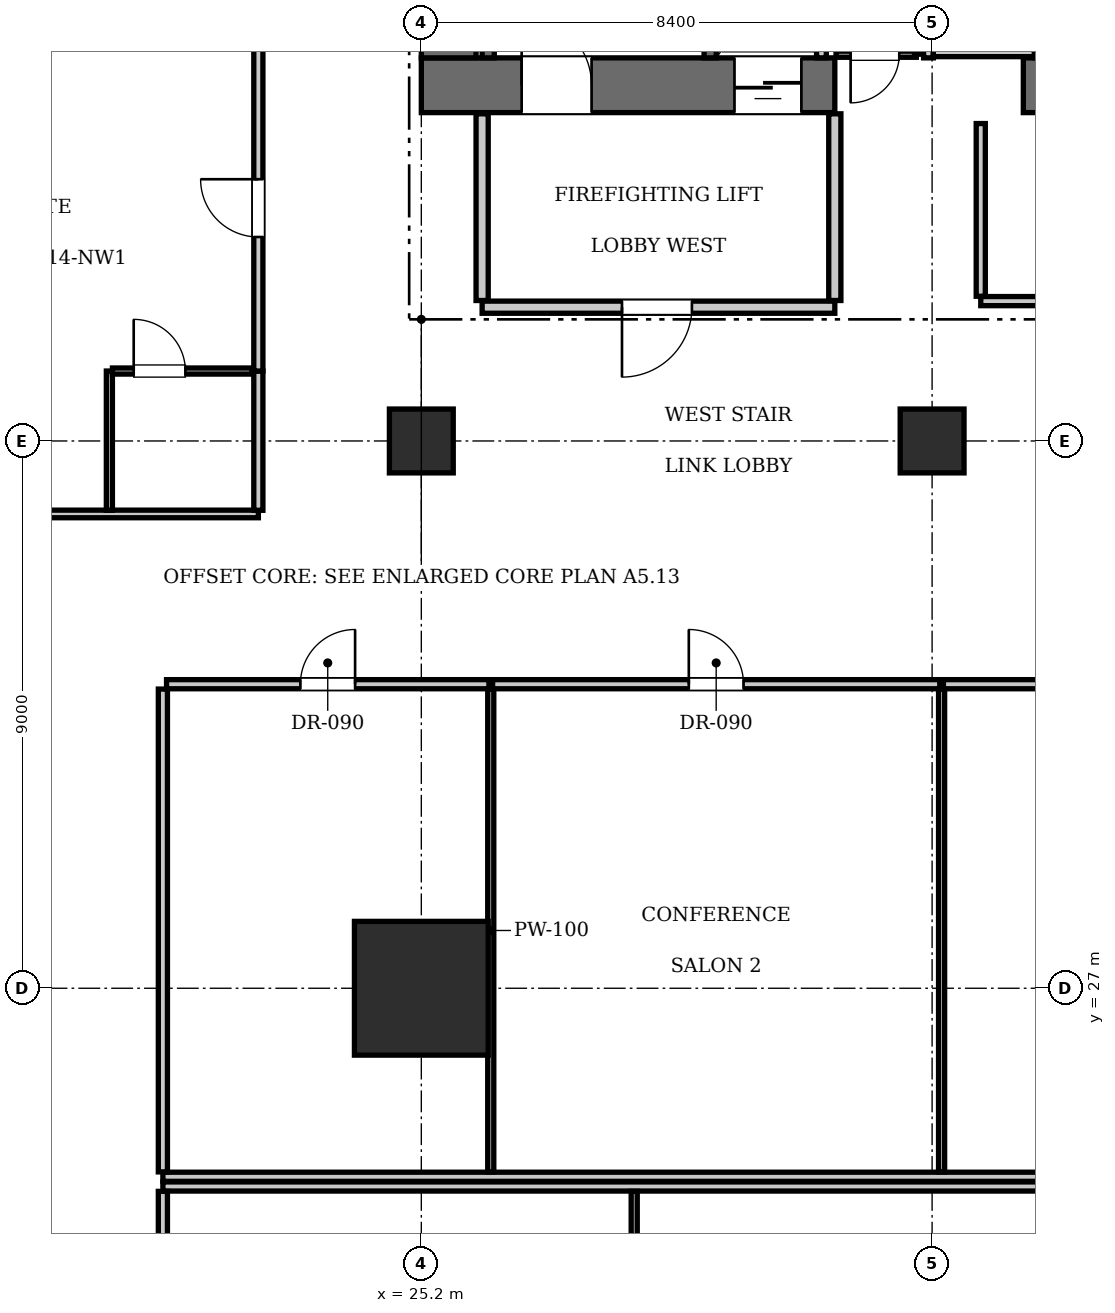
"""IFC4 building model, lengths in metres.
Left out: names, types, materials, properties, quantities, classifications, styles, units other than length and angle.
Written with IfcOpenShell. Run it as: python <this file> out.ifc"""

import sys

from ifc_helpers import new_model, si_unit, direction, frame, frame_2d, origin, origin_2d, place, context, subcontext, project, spatial, rectangle, extrude, element, fill, save


model = new_model("IFC4")
c1 = context("Model", 3, precision=1e-05, world=origin(), true_north=direction((0.0, 1.0)))
c2 = subcontext(c1, "Body", "Model", "MODEL_VIEW")
j1 = project(units=[si_unit("LENGTHUNIT", "METRE"), si_unit("PLANEANGLEUNIT", "RADIAN")], contexts=[c1])
p1 = place(None, origin())
s1 = spatial("IfcSite", under=j1, at=p1, CompositionType="ELEMENT")
p2 = place(p1, origin())
s2 = spatial("IfcBuilding", under=s1, at=p2, CompositionType="ELEMENT")
p3 = place(p2, frame((0.0, 0.0, 61.6)))
s3 = spatial("IfcBuildingStorey", under=s2, at=p3, CompositionType="ELEMENT", Elevation=61.6)
p4 = place(p3, frame((25.2, 27.0, 0.0), z_axis=(0.0, 0.0, 1.0), x_axis=(1.0, 0.0, 0.0)))
e1 = element("IfcColumn", 1, at=p4, inside=s3, PredefinedType="COLUMN", context=c2, shape_type="SweptSolid", body=[
    extrude(rectangle(XDim=2.2, YDim=2.2, at=origin_2d()), origin(), (0.0, 0.0, 1.0), 3.85),
])
p5 = place(p3, frame((25.2, 41.85, 0.0), z_axis=(0.0, 0.0, 1.0), x_axis=(1.0, 0.0, 0.0)))
e2 = element("IfcWall", 2, at=p5, inside=s3, PredefinedType="SHEAR", context=c2, shape_type="SweptSolid", body=[
    extrude(rectangle(XDim=6.8, YDim=0.9, at=frame_2d((3.4, 0.0))), origin(), (0.0, 0.0, 1.0), 3.85),
])
p6 = place(p5, frame((1.65, 0.0, 0.0)))
e3 = element("IfcOpeningElement", 3, at=p6, cuts=e2, PredefinedType="OPENING", context=c2, shape_type="SweptSolid", body=[
    extrude(rectangle(XDim=1.15, YDim=2.15, at=frame_2d((0.575, 1.075))), frame((0.0, 0.46, 0.0), z_axis=(0.0, -1.0, 0.0), x_axis=(1.0, 0.0, 0.0)), (0.0, 0.0, 1.0), 0.92),
])
p7 = place(p5, frame((5.15, 0.0, 0.0)))
e4 = element("IfcOpeningElement", 4, at=p7, cuts=e2, PredefinedType="OPENING", context=c2, shape_type="SweptSolid", body=[
    extrude(rectangle(XDim=1.1, YDim=2.2, at=frame_2d((0.55, 1.1))), frame((0.0, 0.46, 0.0), z_axis=(0.0, -1.0, 0.0), x_axis=(1.0, 0.0, 0.0)), (0.0, 0.0, 1.0), 0.92),
])
p8 = place(p3, frame((35.1, 41.85, 0.0), z_axis=(0.0, 0.0, 1.0), x_axis=(1.0, 0.0, 0.0)))
e5 = element("IfcWall", 5, at=p8, inside=s3, PredefinedType="SHEAR", context=c2, shape_type="SweptSolid", body=[
    extrude(rectangle(XDim=5.4, YDim=0.9, at=frame_2d((2.7, 0.0))), origin(), (0.0, 0.0, 1.0), 3.85),
])
p9 = place(p3, frame((25.65, 42.3, 0.0), z_axis=(0.0, 0.0, 1.0), x_axis=(0.0, 1.0, 0.0)))
e6 = element("IfcWall", 6, at=p9, inside=s3, PredefinedType="SHEAR", context=c2, shape_type="SweptSolid", body=[
    extrude(rectangle(XDim=1.6, YDim=0.9, at=frame_2d((0.8, 0.0))), origin(), (0.0, 0.0, 1.0), 3.85),
])
for number, where, z_axis, x_axis in (
    (7, (25.2, 36.0, 0.0), (0.0, 0.0, 1.0), (1.0, 0.0, 0.0)),
    (8, (33.6, 36.0, 0.0), (0.0, 0.0, 1.0), (1.0, 0.0, 0.0)),
):
    element("IfcColumn", number, at=place(p3, frame(where, z_axis=z_axis, x_axis=x_axis)), inside=s3, PredefinedType="COLUMN", context=c2, shape_type="SweptSolid", body=[
        extrude(rectangle(XDim=1.05, YDim=1.05, at=origin_2d()), origin(), (0.0, 0.0, 1.0), 3.85),
    ])
p10 = place(p3, frame((29.95, 42.3, 0.0), z_axis=(0.0, 0.0, 1.0), x_axis=(0.0, 1.0, 0.0)))
e9 = element("IfcWall", 9, at=p10, inside=s3, PredefinedType="SOLIDWALL", context=c2, shape_type="SweptSolid", body=[
    extrude(rectangle(XDim=8.85, YDim=0.2, at=frame_2d((4.425, 0.0))), origin(), (0.0, 0.0, 1.0), 3.61),
])
p11 = place(p3, frame((26.3, 42.3, 0.0), z_axis=(0.0, 0.0, 1.0), x_axis=(0.0, 1.0, 0.0)))
e10 = element("IfcWall", 10, at=p11, inside=s3, PredefinedType="SOLIDWALL", context=c2, shape_type="SweptSolid", body=[
    extrude(rectangle(XDim=1.58, YDim=0.2, at=frame_2d((0.79, 0.0))), origin(), (0.0, 0.0, 1.0), 3.61),
])
p12 = place(p3, frame((31.78, 42.3, 0.0), z_axis=(0.0, 0.0, 1.0), x_axis=(0.0, 1.0, 0.0)))
e11 = element("IfcWall", 11, at=p12, inside=s3, PredefinedType="SOLIDWALL", context=c2, shape_type="SweptSolid", body=[
    extrude(rectangle(XDim=2.44, YDim=0.16, at=frame_2d((1.22, 0.0))), origin(), (0.0, 0.0, 1.0), 3.61),
])
for number, where, z_axis, x_axis in (
    (12, (33.54, 42.3, 0.0), (0.0, 0.0, 1.0), (0.0, 1.0, 0.0)),
    (13, (35.36, 42.3, 0.0), (0.0, 0.0, 1.0), (0.0, 1.0, 0.0)),
):
    element("IfcWall", number, at=place(p3, frame(where, z_axis=z_axis, x_axis=x_axis)), inside=s3, PredefinedType="SOLIDWALL", context=c2, shape_type="SweptSolid", body=[
        extrude(rectangle(XDim=2.1, YDim=0.16, at=frame_2d((1.05, 0.0))), origin(), (0.0, 0.0, 1.0), 3.61),
    ])
p13 = place(p3, frame((33.62, 42.4, 0.0), z_axis=(0.0, 0.0, 1.0), x_axis=(1.0, 0.0, 0.0)))
e14 = element("IfcWall", 14, at=p13, inside=s3, PredefinedType="SOLIDWALL", context=c2, shape_type="SweptSolid", body=[
    extrude(rectangle(XDim=1.66, YDim=0.16, at=frame_2d((0.83, 0.0))), origin(), (0.0, 0.0, 1.0), 3.61),
])
p14 = place(p3, frame((26.2, 38.2, 0.0), z_axis=(0.0, 0.0, 1.0), x_axis=(1.0, 0.0, 0.0)))
e15 = element("IfcWall", 15, at=p14, inside=s3, PredefinedType="PARTITIONING", context=c2, shape_type="SweptSolid", body=[
    extrude(rectangle(XDim=5.8, YDim=0.2, at=frame_2d((2.9, 0.0))), origin(), (0.0, 0.0, 1.0), 3.61),
])
p15 = place(p14, frame((2.3, 0.0, 0.0)))
e16 = element("IfcOpeningElement", 16, at=p15, cuts=e15, PredefinedType="OPENING", context=c2, shape_type="SweptSolid", body=[
    extrude(rectangle(XDim=1.15, YDim=2.15, at=frame_2d((0.575, 1.075))), frame((0.0, 0.11, 0.0), z_axis=(0.0, -1.0, 0.0), x_axis=(1.0, 0.0, 0.0)), (0.0, 0.0, 1.0), 0.22),
])
for number, where, z_axis, x_axis in (
    (17, (26.2, 38.31, 0.0), (0.0, 0.0, 1.0), (0.0, 1.0, 0.0)),
    (18, (32.0, 38.31, 0.0), (0.0, 0.0, 1.0), (0.0, 1.0, 0.0)),
):
    element("IfcWall", number, at=place(p3, frame(where, z_axis=z_axis, x_axis=x_axis)), inside=s3, PredefinedType="PARTITIONING", context=c2, shape_type="SweptSolid", body=[
        extrude(rectangle(XDim=3.07, YDim=0.2, at=frame_2d((1.535, 0.0))), origin(), (0.0, 0.0, 1.0), 3.61),
    ])
p16 = place(p3, frame((32.02, 42.36, 0.0), z_axis=(0.0, 0.0, 1.0), x_axis=(1.0, 0.0, 0.0)))
e19 = element("IfcWall", 19, at=p16, inside=s3, PredefinedType="PARTITIONING", context=c2, shape_type="SweptSolid", body=[
    extrude(rectangle(XDim=1.32, YDim=0.1, at=frame_2d((0.66, 0.0))), origin(), (0.0, 0.0, 1.0), 3.61),
])
p17 = place(p16, frame((0.24, 0.0, 0.0)))
e20 = element("IfcOpeningElement", 20, at=p17, cuts=e19, PredefinedType="OPENING", context=c2, shape_type="SweptSolid", body=[
    extrude(rectangle(XDim=0.8, YDim=2.05, at=frame_2d((0.4, 1.025))), frame((0.0, 0.06, 0.0), z_axis=(0.0, -1.0, 0.0), x_axis=(1.0, 0.0, 0.0)), (0.0, 0.0, 1.0), 0.12),
])
p18 = place(p3, frame((33.36, 42.36, 0.0), z_axis=(0.0, 0.0, 1.0), x_axis=(0.0, 1.0, 0.0)))
e21 = element("IfcWall", 21, at=p18, inside=s3, PredefinedType="PARTITIONING", context=c2, shape_type="SweptSolid", body=[
    extrude(rectangle(XDim=2.58, YDim=0.1, at=frame_2d((1.29, 0.0))), origin(), (0.0, 0.0, 1.0), 3.61),
])
p19 = place(p3, frame((34.4, 38.3, 0.0), z_axis=(0.0, 0.0, 1.0), x_axis=(1.0, 0.0, 0.0)))
e22 = element("IfcWall", 22, at=p19, inside=s3, PredefinedType="PARTITIONING", context=c2, shape_type="SweptSolid", body=[
    extrude(rectangle(XDim=2.88, YDim=0.15, at=frame_2d((1.44, 0.0))), origin(), (0.0, 0.0, 1.0), 3.61),
])
p20 = place(p19, frame((1.0, 0.0, 0.0)))
e23 = element("IfcOpeningElement", 23, at=p20, cuts=e22, PredefinedType="OPENING", context=c2, shape_type="SweptSolid", body=[
    extrude(rectangle(XDim=0.8, YDim=2.05, at=frame_2d((0.4, 1.025))), frame((0.0, 0.085, 0.0), z_axis=(0.0, -1.0, 0.0), x_axis=(1.0, 0.0, 0.0)), (0.0, 0.0, 1.0), 0.17),
])
p21 = place(p3, frame((34.4, 38.38, 0.0), z_axis=(0.0, 0.0, 1.0), x_axis=(0.0, 1.0, 0.0)))
e24 = element("IfcWall", 24, at=p21, inside=s3, PredefinedType="PARTITIONING", context=c2, shape_type="SweptSolid", body=[
    extrude(rectangle(XDim=2.84, YDim=0.15, at=frame_2d((1.42, 0.0))), origin(), (0.0, 0.0, 1.0), 3.61),
])
p22 = place(p3, frame((20.95, 23.9, 0.0), z_axis=(0.0, 0.0, 1.0), x_axis=(1.0, 0.0, 0.0)))
e25 = element("IfcWall", 25, at=p22, inside=s3, PredefinedType="PARTITIONING", context=c2, shape_type="SweptSolid", body=[
    extrude(rectangle(XDim=33.7, YDim=0.15, at=frame_2d((16.85, 0.0))), origin(), (0.0, 0.0, 1.0), 3.61),
])
p23 = place(p3, frame((20.95, 23.98, 0.0), z_axis=(0.0, 0.0, 1.0), x_axis=(0.0, 1.0, 0.0)))
e26 = element("IfcWall", 26, at=p23, inside=s3, PredefinedType="PARTITIONING", context=c2, shape_type="SweptSolid", body=[
    extrude(rectangle(XDim=7.94, YDim=0.15, at=frame_2d((3.97, 0.0))), origin(), (0.0, 0.0, 1.0), 3.255),
])
p24 = place(p3, frame((21.01, 32.0, 0.0), z_axis=(0.0, 0.0, 1.0), x_axis=(1.0, 0.0, 0.0)))
e27 = element("IfcWall", 27, at=p24, inside=s3, PredefinedType="PARTITIONING", context=c2, shape_type="SweptSolid", body=[
    extrude(rectangle(XDim=5.302, YDim=0.15, at=frame_2d((2.651, 0.0))), origin(), (0.0, 0.0, 1.0), 3.61),
])
p25 = place(p24, frame((2.201, 0.0, 0.0)))
e28 = element("IfcOpeningElement", 28, at=p25, cuts=e27, PredefinedType="OPENING", context=c2, shape_type="SweptSolid", body=[
    extrude(rectangle(XDim=0.9, YDim=2.1, at=frame_2d((0.45, 1.05))), frame((0.0, 0.085, 0.0), z_axis=(0.0, -1.0, 0.0), x_axis=(1.0, 0.0, 0.0)), (0.0, 0.0, 1.0), 0.17),
])
p26 = place(p3, frame((26.342, 23.98, 0.0), z_axis=(0.0, 0.0, 1.0), x_axis=(0.0, 1.0, 0.0)))
e29 = element("IfcWall", 29, at=p26, inside=s3, PredefinedType="PARTITIONING", context=c2, shape_type="SweptSolid", body=[
    extrude(rectangle(XDim=7.94, YDim=0.1, at=frame_2d((3.97, 0.0))), origin(), (0.0, 0.0, 1.0), 3.61),
])
p27 = place(p3, frame((26.372, 32.0, 0.0), z_axis=(0.0, 0.0, 1.0), x_axis=(1.0, 0.0, 0.0)))
e30 = element("IfcWall", 30, at=p27, inside=s3, PredefinedType="PARTITIONING", context=c2, shape_type="SweptSolid", body=[
    extrude(rectangle(XDim=7.354, YDim=0.15, at=frame_2d((3.677, 0.0))), origin(), (0.0, 0.0, 1.0), 3.61),
])
p28 = place(p27, frame((3.227, 0.0, 0.0)))
e31 = element("IfcOpeningElement", 31, at=p28, cuts=e30, PredefinedType="OPENING", context=c2, shape_type="SweptSolid", body=[
    extrude(rectangle(XDim=0.9, YDim=2.1, at=frame_2d((0.45, 1.05))), frame((0.0, 0.085, 0.0), z_axis=(0.0, -1.0, 0.0), x_axis=(1.0, 0.0, 0.0)), (0.0, 0.0, 1.0), 0.17),
])
p29 = place(p3, frame((33.756, 23.98, 0.0), z_axis=(0.0, 0.0, 1.0), x_axis=(0.0, 1.0, 0.0)))
e32 = element("IfcWall", 32, at=p29, inside=s3, PredefinedType="PARTITIONING", context=c2, shape_type="SweptSolid", body=[
    extrude(rectangle(XDim=7.94, YDim=0.1, at=frame_2d((3.97, 0.0))), origin(), (0.0, 0.0, 1.0), 2.988),
])
p30 = place(p3, frame((33.786, 32.0, 0.0), z_axis=(0.0, 0.0, 1.0), x_axis=(1.0, 0.0, 0.0)))
e33 = element("IfcWall", 33, at=p30, inside=s3, PredefinedType="PARTITIONING", context=c2, shape_type="SweptSolid", body=[
    extrude(rectangle(XDim=9.376, YDim=0.15, at=frame_2d((4.688, 0.0))), origin(), (0.0, 0.0, 1.0), 3.61),
])
p31 = place(p30, frame((4.238, 0.0, 0.0)))
e34 = element("IfcOpeningElement", 34, at=p31, cuts=e33, PredefinedType="OPENING", context=c2, shape_type="SweptSolid", body=[
    extrude(rectangle(XDim=0.9, YDim=2.1, at=frame_2d((0.45, 1.05))), frame((0.0, 0.085, 0.0), z_axis=(0.0, -1.0, 0.0), x_axis=(1.0, 0.0, 0.0)), (0.0, 0.0, 1.0), 0.17),
])
p32 = place(p3, frame((20.95, 23.74, 0.0), z_axis=(0.0, 0.0, 1.0), x_axis=(1.0, 0.0, 0.0)))
e35 = element("IfcWall", 35, at=p32, inside=s3, PredefinedType="PARTITIONING", context=c2, shape_type="SweptSolid", body=[
    extrude(rectangle(XDim=33.7, YDim=0.15, at=frame_2d((16.85, 0.0))), origin(), (0.0, 0.0, 1.0), 3.61),
])
p33 = place(p3, frame((20.95, 15.73, 0.0), z_axis=(0.0, 0.0, 1.0), x_axis=(0.0, 1.0, 0.0)))
e36 = element("IfcWall", 36, at=p33, inside=s3, PredefinedType="PARTITIONING", context=c2, shape_type="SweptSolid", body=[
    extrude(rectangle(XDim=7.93, YDim=0.15, at=frame_2d((3.965, 0.0))), origin(), (0.0, 0.0, 1.0), 3.255),
])
p34 = place(p3, frame((28.701, 15.73, 0.0), z_axis=(0.0, 0.0, 1.0), x_axis=(0.0, 1.0, 0.0)))
e37 = element("IfcWall", 37, at=p34, inside=s3, PredefinedType="PARTITIONING", context=c2, shape_type="SweptSolid", body=[
    extrude(rectangle(XDim=7.93, YDim=0.1, at=frame_2d((3.965, 0.0))), origin(), (0.0, 0.0, 1.0), 3.61),
])
p35 = place(p3, frame((10.9, 34.8, 0.0), z_axis=(0.0, 0.0, 1.0), x_axis=(1.0, 0.0, 0.0)))
e38 = element("IfcWall", 38, at=p35, inside=s3, PredefinedType="PARTITIONING", context=c2, shape_type="SweptSolid", body=[
    extrude(rectangle(XDim=11.62, YDim=0.125, at=frame_2d((5.81, 0.0))), origin(), (0.0, 0.0, 1.0), 3.61),
])
p36 = place(p3, frame((22.52, 34.86, 0.0), z_axis=(0.0, 0.0, 1.0), x_axis=(0.0, 1.0, 0.0)))
e39 = element("IfcWall", 39, at=p36, inside=s3, PredefinedType="PARTITIONING", context=c2, shape_type="SweptSolid", body=[
    extrude(rectangle(XDim=2.29, YDim=0.15, at=frame_2d((1.145, 0.0))), origin(), (0.0, 0.0, 1.0), 3.61),
])
p37 = place(p3, frame((22.52, 37.15, 0.0), z_axis=(0.0, 0.0, 1.0), x_axis=(0.0, 1.0, 0.0)))
e40 = element("IfcWall", 40, at=p37, inside=s3, PredefinedType="PARTITIONING", context=c2, shape_type="SweptSolid", body=[
    extrude(rectangle(XDim=5.359, YDim=0.15, at=frame_2d((2.679, 0.0))), origin(), (0.0, 0.0, 1.0), 3.61),
])
p38 = place(p37, frame((2.204, 0.0, 0.0)))
e41 = element("IfcOpeningElement", 41, at=p38, cuts=e40, PredefinedType="OPENING", context=c2, shape_type="SweptSolid", body=[
    extrude(rectangle(XDim=0.95, YDim=2.15, at=frame_2d((0.475, 1.075))), frame((0.0, 0.085, 0.0), z_axis=(0.0, -1.0, 0.0), x_axis=(1.0, 0.0, 0.0)), (0.0, 0.0, 1.0), 0.17),
])
p39 = place(p3, frame((20.07, 34.86, 0.0), z_axis=(0.0, 0.0, 1.0), x_axis=(0.0, 1.0, 0.0)))
e42 = element("IfcWall", 42, at=p39, inside=s3, PredefinedType="PARTITIONING", context=c2, shape_type="SweptSolid", body=[
    extrude(rectangle(XDim=2.29, YDim=0.1, at=frame_2d((1.145, 0.0))), origin(), (0.0, 0.0, 1.0), 3.61),
])
p40 = place(p3, frame((20.12, 37.15, 0.0), z_axis=(0.0, 0.0, 1.0), x_axis=(1.0, 0.0, 0.0)))
e43 = element("IfcWall", 43, at=p40, inside=s3, PredefinedType="PARTITIONING", context=c2, shape_type="SweptSolid", body=[
    extrude(rectangle(XDim=2.3, YDim=0.1, at=frame_2d((1.15, 0.0))), origin(), (0.0, 0.0, 1.0), 3.61),
])
p41 = place(p40, frame((0.35, 0.0, 0.0)))
e44 = element("IfcOpeningElement", 44, at=p41, cuts=e43, PredefinedType="OPENING", context=c2, shape_type="SweptSolid", body=[
    extrude(rectangle(XDim=0.85, YDim=2.1, at=frame_2d((0.425, 1.05))), frame((0.0, 0.06, 0.0), z_axis=(0.0, -1.0, 0.0), x_axis=(1.0, 0.0, 0.0)), (0.0, 0.0, 1.0), 0.12),
])
p42 = place(p6, origin())
e45 = element("IfcDoor", 45, at=p42, inside=s3, OperationType="SINGLE_SWING_LEFT", PredefinedType="DOOR", context=c2, shape_type="SweptSolid", body=[
    extrude(rectangle(XDim=1.15, YDim=2.15, at=frame_2d((0.575, 1.075))), frame((0.0, 0.025, 0.0), z_axis=(0.0, -1.0, 0.0), x_axis=(1.0, 0.0, 0.0)), (0.0, 0.0, 1.0), 0.05),
])
fill(e3, e45)
p43 = place(p7, frame((1.1, 0.0, 0.0), z_axis=(0.0, 0.0, 1.0), x_axis=(-1.0, 0.0, 0.0)))
e46 = element("IfcDoor", 46, at=p43, inside=s3, OperationType="SLIDING_TO_LEFT", PredefinedType="DOOR", context=c2, shape_type="SweptSolid", body=[
    extrude(rectangle(XDim=1.1, YDim=2.2, at=frame_2d((0.55, 1.1))), frame((0.0, 0.025, 0.0), z_axis=(0.0, -1.0, 0.0), x_axis=(1.0, 0.0, 0.0)), (0.0, 0.0, 1.0), 0.05),
])
fill(e4, e46)
p44 = place(p15, frame((1.15, 0.0, 0.0), z_axis=(0.0, 0.0, 1.0), x_axis=(-1.0, 0.0, 0.0)))
e47 = element("IfcDoor", 47, at=p44, inside=s3, OperationType="SINGLE_SWING_RIGHT", PredefinedType="DOOR", context=c2, shape_type="SweptSolid", body=[
    extrude(rectangle(XDim=1.15, YDim=2.15, at=frame_2d((0.575, 1.075))), frame((0.0, 0.025, 0.0), z_axis=(0.0, -1.0, 0.0), x_axis=(1.0, 0.0, 0.0)), (0.0, 0.0, 1.0), 0.05),
])
fill(e16, e47)
p45 = place(p17, frame((0.8, 0.0, 0.0), z_axis=(0.0, 0.0, 1.0), x_axis=(-1.0, 0.0, 0.0)))
e48 = element("IfcDoor", 48, at=p45, inside=s3, OperationType="SINGLE_SWING_RIGHT", PredefinedType="DOOR", context=c2, shape_type="SweptSolid", body=[
    extrude(rectangle(XDim=0.8, YDim=2.05, at=frame_2d((0.4, 1.025))), frame((0.0, 0.025, 0.0), z_axis=(0.0, -1.0, 0.0), x_axis=(1.0, 0.0, 0.0)), (0.0, 0.0, 1.0), 0.05),
])
fill(e20, e48)
p46 = place(p25, origin())
e49 = element("IfcDoor", 49, at=p46, inside=s3, OperationType="SINGLE_SWING_RIGHT", PredefinedType="DOOR", context=c2, shape_type="SweptSolid", body=[
    extrude(rectangle(XDim=0.9, YDim=2.1, at=frame_2d((0.45, 1.05))), frame((0.0, 0.025, 0.0), z_axis=(0.0, -1.0, 0.0), x_axis=(1.0, 0.0, 0.0)), (0.0, 0.0, 1.0), 0.05),
])
fill(e28, e49)
p47 = place(p28, origin())
e50 = element("IfcDoor", 50, at=p47, inside=s3, OperationType="SINGLE_SWING_LEFT", PredefinedType="DOOR", context=c2, shape_type="SweptSolid", body=[
    extrude(rectangle(XDim=0.9, YDim=2.1, at=frame_2d((0.45, 1.05))), frame((0.0, 0.025, 0.0), z_axis=(0.0, -1.0, 0.0), x_axis=(1.0, 0.0, 0.0)), (0.0, 0.0, 1.0), 0.05),
])
fill(e31, e50)
p48 = place(p41, origin())
e51 = element("IfcDoor", 51, at=p48, inside=s3, OperationType="SINGLE_SWING_LEFT", PredefinedType="DOOR", context=c2, shape_type="SweptSolid", body=[
    extrude(rectangle(XDim=0.85, YDim=2.1, at=frame_2d((0.425, 1.05))), frame((0.0, 0.025, 0.0), z_axis=(0.0, -1.0, 0.0), x_axis=(1.0, 0.0, 0.0)), (0.0, 0.0, 1.0), 0.05),
])
fill(e44, e51)
p49 = place(p38, origin())
e52 = element("IfcDoor", 52, at=p49, inside=s3, OperationType="SINGLE_SWING_RIGHT", PredefinedType="DOOR", context=c2, shape_type="SweptSolid", body=[
    extrude(rectangle(XDim=0.95, YDim=2.15, at=frame_2d((0.475, 1.075))), frame((0.0, 0.025, 0.0), z_axis=(0.0, -1.0, 0.0), x_axis=(1.0, 0.0, 0.0)), (0.0, 0.0, 1.0), 0.05),
])
fill(e41, e52)
save(model, sys.argv[1])
